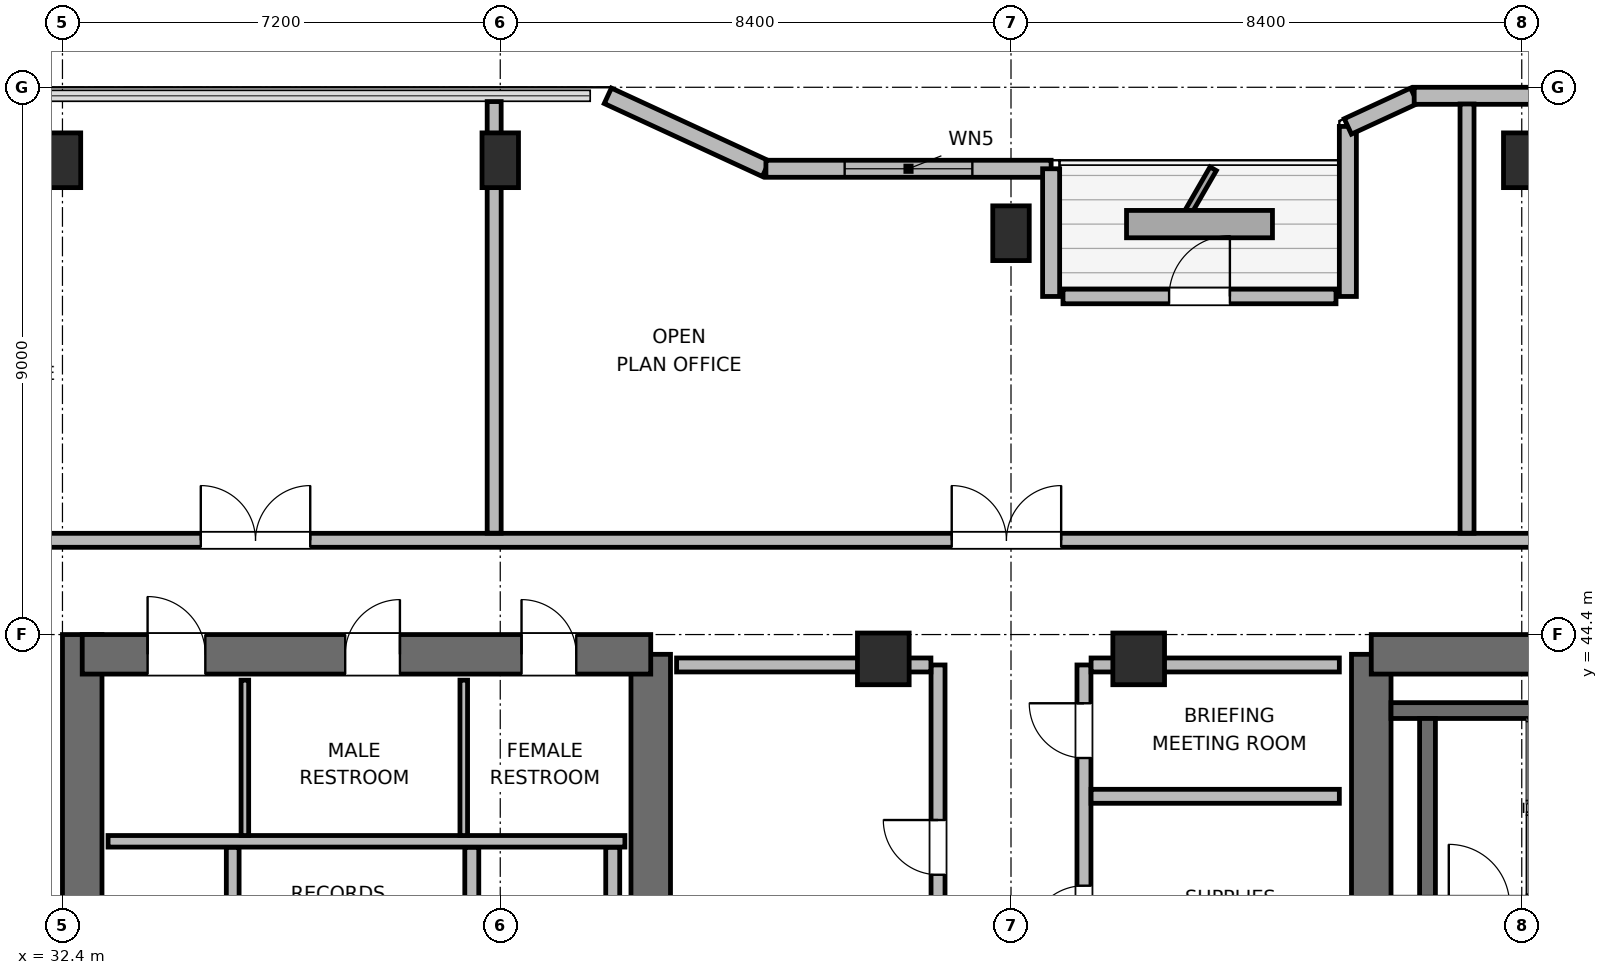
"""IFC4 building model, lengths in metres.
Left out: names, types, materials, properties, quantities, classifications, styles, units other than length and angle.
Written with IfcOpenShell. Run it as: python <this file> out.ifc"""

import sys

from ifc_helpers import new_model, si_unit, direction, frame, frame_2d, origin, origin_2d, place, context, subcontext, project, spatial, rectangle, extrude, element, fill, save


model = new_model("IFC4")
c1 = context("Model", 3, precision=1e-05, world=origin(), true_north=direction((0.0, 1.0)))
c2 = subcontext(c1, "Body", "Model", "MODEL_VIEW")
j1 = project(units=[si_unit("LENGTHUNIT", "METRE"), si_unit("PLANEANGLEUNIT", "RADIAN")], contexts=[c1])
p1 = place(None, origin())
s1 = spatial("IfcSite", under=j1, at=p1, CompositionType="ELEMENT")
p2 = place(p1, origin())
s2 = spatial("IfcBuilding", under=s1, at=p2, CompositionType="ELEMENT")
p3 = place(p2, frame((0.0, 0.0, 255.0)))
s3 = spatial("IfcBuildingStorey", under=s2, at=p3, CompositionType="ELEMENT", Elevation=255.0)
p4 = place(p3, frame((32.725, 27.6, 0.0), z_axis=(0.0, 0.0, 1.0), x_axis=(0.0, 1.0, 0.0)))
e1 = element("IfcWall", 1, at=p4, inside=s3, PredefinedType="SHEAR", context=c2, shape_type="SweptSolid", body=[
    extrude(rectangle(XDim=16.8, YDim=0.65, at=frame_2d((8.4, 0.0))), origin(), (0.0, 0.0, 1.0), 3.9),
])
p5 = place(p3, frame((42.075, 37.8, 0.0), z_axis=(0.0, 0.0, 1.0), x_axis=(0.0, 1.0, 0.0)))
e2 = element("IfcWall", 2, at=p5, inside=s3, PredefinedType="SHEAR", context=c2, shape_type="SweptSolid", body=[
    extrude(rectangle(XDim=6.275, YDim=0.65, at=frame_2d((3.137, 0.0))), origin(), (0.0, 0.0, 1.0), 3.9),
])
p6 = place(p3, frame((32.725, 44.075, 0.0), z_axis=(0.0, 0.0, 1.0), x_axis=(1.0, 0.0, 0.0)))
e3 = element("IfcWall", 3, at=p6, inside=s3, PredefinedType="SHEAR", context=c2, shape_type="SweptSolid", body=[
    extrude(rectangle(XDim=9.35, YDim=0.65, at=frame_2d((4.675, 0.0))), origin(), (0.0, 0.0, 1.0), 3.9),
])
p7 = place(p6, frame((1.075, 0.0, 0.0)))
e4 = element("IfcOpeningElement", 4, at=p7, cuts=e3, PredefinedType="OPENING", context=c2, shape_type="SweptSolid", body=[
    extrude(rectangle(XDim=0.95, YDim=2.04, at=frame_2d((0.475, 1.02))), frame((0.0, 0.335, 0.0), z_axis=(0.0, -1.0, 0.0), x_axis=(1.0, 0.0, 0.0)), (0.0, 0.0, 1.0), 0.67),
])
p8 = place(p6, frame((4.325, 0.0, 0.0)))
e5 = element("IfcOpeningElement", 5, at=p8, cuts=e3, PredefinedType="OPENING", context=c2, shape_type="SweptSolid", body=[
    extrude(rectangle(XDim=0.9, YDim=2.02, at=frame_2d((0.45, 1.01))), frame((0.0, 0.335, 0.0), z_axis=(0.0, -1.0, 0.0), x_axis=(1.0, 0.0, 0.0)), (0.0, 0.0, 1.0), 0.67),
])
p9 = place(p6, frame((7.225, 0.0, 0.0)))
e6 = element("IfcOpeningElement", 6, at=p9, cuts=e3, PredefinedType="OPENING", context=c2, shape_type="SweptSolid", body=[
    extrude(rectangle(XDim=0.9, YDim=2.02, at=frame_2d((0.45, 1.01))), frame((0.0, 0.335, 0.0), z_axis=(0.0, -1.0, 0.0), x_axis=(1.0, 0.0, 0.0)), (0.0, 0.0, 1.0), 0.67),
])
p10 = place(p3, frame((53.925, 38.0, 0.0), z_axis=(0.0, 0.0, 1.0), x_axis=(0.0, 1.0, 0.0)))
e7 = element("IfcWall", 7, at=p10, inside=s3, PredefinedType="SHEAR", context=c2, shape_type="SweptSolid", body=[
    extrude(rectangle(XDim=6.075, YDim=0.65, at=frame_2d((3.038, 0.0))), origin(), (0.0, 0.0, 1.0), 3.9),
])
p11 = place(p3, frame((53.925, 44.075, 0.0), z_axis=(0.0, 0.0, 1.0), x_axis=(1.0, 0.0, 0.0)))
e8 = element("IfcWall", 8, at=p11, inside=s3, PredefinedType="SHEAR", context=c2, shape_type="SweptSolid", body=[
    extrude(rectangle(XDim=9.35, YDim=0.65, at=frame_2d((4.675, 0.0))), origin(), (0.0, 0.0, 1.0), 3.9),
])
p12 = place(p3, frame((54.25, 43.15, 0.0), z_axis=(0.0, 0.0, 1.0), x_axis=(1.0, 0.0, 0.0)))
e9 = element("IfcWall", 9, at=p12, inside=s3, PredefinedType="SHEAR", context=c2, shape_type="SweptSolid", body=[
    extrude(rectangle(XDim=8.7, YDim=0.26, at=frame_2d((4.35, 0.0))), origin(), (0.0, 0.0, 1.0), 3.9),
])
p13 = place(p3, frame((54.85, 40.08, 0.0), z_axis=(0.0, 0.0, 1.0), x_axis=(0.0, 1.0, 0.0)))
e10 = element("IfcWall", 10, at=p13, inside=s3, PredefinedType="SHEAR", context=c2, shape_type="SweptSolid", body=[
    extrude(rectangle(XDim=2.94, YDim=0.26, at=frame_2d((1.47, 0.0))), origin(), (0.0, 0.0, 1.0), 3.9),
])
for number, where, z_axis, x_axis in (
    (11, (32.4, 52.2, 0.0), (0.0, 0.0, 1.0), (1.0, 0.0, 0.0)),
    (12, (39.6, 52.2, 0.0), (0.0, 0.0, 1.0), (1.0, 0.0, 0.0)),
    (13, (48.0, 51.0, 0.0), (0.0, 0.0, 1.0), (1.0, 0.0, 0.0)),
    (14, (56.4, 52.2, 0.0), (0.0, 0.0, 1.0), (1.0, 0.0, 0.0)),
):
    element("IfcColumn", number, at=place(p3, frame(where, z_axis=z_axis, x_axis=x_axis)), inside=s3, PredefinedType="COLUMN", context=c2, shape_type="SweptSolid", body=[
        extrude(rectangle(XDim=0.6, YDim=0.9, at=origin_2d()), origin(), (0.0, 0.0, 1.0), 3.9),
    ])
for number, where, z_axis, x_axis in (
    (15, (45.9, 44.0, 0.0), (0.0, 0.0, 1.0), (1.0, 0.0, 0.0)),
    (16, (50.1, 44.0, 0.0), (0.0, 0.0, 1.0), (1.0, 0.0, 0.0)),
):
    element("IfcColumn", number, at=place(p3, frame(where, z_axis=z_axis, x_axis=x_axis)), inside=s3, PredefinedType="COLUMN", context=c2, shape_type="SweptSolid", body=[
        extrude(rectangle(XDim=0.85, YDim=0.85, at=origin_2d()), origin(), (0.0, 0.0, 1.0), 3.9),
    ])
p14 = place(p3, frame((41.369, 53.26, 0.0), z_axis=(0.0, 0.0, 1.0), x_axis=(0.907956889006, -0.419063584324, 0.0)))
e17 = element("IfcWall", 17, at=p14, inside=s3, PredefinedType="SOLIDWALL", context=c2, shape_type="SweptSolid", body=[
    extrude(rectangle(XDim=2.864, YDim=0.28, at=frame_2d((1.432, 0.0))), origin(), (0.0, 0.0, 1.0), 2.265),
])
p15 = place(p3, frame((43.969, 52.06, 0.0), z_axis=(0.0, 0.0, 1.0), x_axis=(1.0, 0.0, 0.0)))
e18 = element("IfcWall", 18, at=p15, inside=s3, PredefinedType="SOLIDWALL", context=c2, shape_type="SweptSolid", body=[
    extrude(rectangle(XDim=4.691, YDim=0.28, at=frame_2d((2.345, 0.0))), origin(), (0.0, 0.0, 1.0), 2.265),
])
p16 = place(p15, frame((1.295, 0.0, 0.85)))
e19 = element("IfcOpeningElement", 19, at=p16, cuts=e18, PredefinedType="OPENING", context=c2, shape_type="SweptSolid", body=[
    extrude(rectangle(XDim=2.1, YDim=1.05, at=frame_2d((1.05, 0.525))), frame((0.0, 0.15, 0.0), z_axis=(0.0, -1.0, 0.0), x_axis=(1.0, 0.0, 0.0)), (0.0, 0.0, 1.0), 0.3),
])
p17 = place(p3, frame((48.66, 52.06, 0.0), z_axis=(0.0, 0.0, 1.0), x_axis=(0.0, -1.0, 0.0)))
e20 = element("IfcWall", 20, at=p17, inside=s3, PredefinedType="SOLIDWALL", context=c2, shape_type="SweptSolid", body=[
    extrude(rectangle(XDim=2.1, YDim=0.28, at=frame_2d((1.05, 0.0))), origin(), (0.0, 0.0, 1.0), 2.265),
])
p18 = place(p3, frame((48.855, 49.96, 0.0), z_axis=(0.0, 0.0, 1.0), x_axis=(1.0, 0.0, 0.0)))
e21 = element("IfcWall", 21, at=p18, inside=s3, PredefinedType="SOLIDWALL", context=c2, shape_type="SweptSolid", body=[
    extrude(rectangle(XDim=4.49, YDim=0.24, at=frame_2d((2.245, 0.0))), origin(), (0.0, 0.0, 1.0), 2.215),
])
p19 = place(p18, frame((1.745, 0.0, 0.0)))
e22 = element("IfcOpeningElement", 22, at=p19, cuts=e21, PredefinedType="OPENING", context=c2, shape_type="SweptSolid", body=[
    extrude(rectangle(XDim=1.0, YDim=2.02, at=frame_2d((0.5, 1.01))), frame((0.0, 0.13, 0.0), z_axis=(0.0, -1.0, 0.0), x_axis=(1.0, 0.0, 0.0)), (0.0, 0.0, 1.0), 0.26),
])
p20 = place(p3, frame((53.54, 49.96, 0.0), z_axis=(0.0, 0.0, 1.0), x_axis=(0.0, 1.0, 0.0)))
e23 = element("IfcWall", 23, at=p20, inside=s3, PredefinedType="SOLIDWALL", context=c2, shape_type="SweptSolid", body=[
    extrude(rectangle(XDim=2.796, YDim=0.28, at=frame_2d((1.398, 0.0))), origin(), (0.0, 0.0, 1.0), 2.265),
])
p21 = place(p3, frame((53.54, 52.756, 0.0), z_axis=(0.0, 0.0, 1.0), x_axis=(0.907893953211, 0.419199916176, 0.0)))
e24 = element("IfcWall", 24, at=p21, inside=s3, PredefinedType="SOLIDWALL", context=c2, shape_type="SweptSolid", body=[
    extrude(rectangle(XDim=1.201, YDim=0.28, at=frame_2d((0.601, 0.0))), origin(), (0.0, 0.0, 1.0), 3.68),
])
p22 = place(p3, frame((54.631, 53.26, 0.0), z_axis=(0.0, 0.0, 1.0), x_axis=(1.0, 0.0, 0.0)))
e25 = element("IfcWall", 25, at=p22, inside=s3, PredefinedType="SOLIDWALL", context=c2, shape_type="SweptSolid", body=[
    extrude(rectangle(XDim=11.351, YDim=0.28, at=frame_2d((5.675, 0.0))), origin(), (0.0, 0.0, 1.0), 3.68),
])
p23 = place(p3, frame((33.15, 41.0, 0.0), z_axis=(0.0, 0.0, 1.0), x_axis=(1.0, 0.0, 0.0)))
e26 = element("IfcWall", 26, at=p23, inside=s3, PredefinedType="PLUMBINGWALL", context=c2, shape_type="SweptSolid", body=[
    extrude(rectangle(XDim=8.5, YDim=0.19, at=frame_2d((4.25, 0.0))), origin(), (0.0, 0.0, 1.0), 3.68),
])
for number, where, z_axis, x_axis in (
    (27, (35.4, 41.095, 0.0), (0.0, 0.0, 1.0), (0.0, 1.0, 0.0)),
    (28, (39.0, 41.095, 0.0), (0.0, 0.0, 1.0), (0.0, 1.0, 0.0)),
):
    element("IfcWall", number, at=place(p3, frame(where, z_axis=z_axis, x_axis=x_axis)), inside=s3, PredefinedType="PARTITIONING", context=c2, shape_type="SweptSolid", body=[
        extrude(rectangle(XDim=2.555, YDim=0.125, at=frame_2d((1.277, 0.0))), origin(), (0.0, 0.0, 1.0), 3.68),
    ])
p24 = place(p3, frame((35.2, 39.58, 0.0), z_axis=(0.0, 0.0, 1.0), x_axis=(0.0, 1.0, 0.0)))
e29 = element("IfcWall", 29, at=p24, inside=s3, PredefinedType="PARTITIONING", context=c2, shape_type="SweptSolid", body=[
    extrude(rectangle(XDim=1.32, YDim=0.21, at=frame_2d((0.66, 0.0))), origin(), (0.0, 0.0, 1.0), 3.68),
])
for number, where, z_axis, x_axis in (
    (30, (41.45, 38.117, 0.0), (0.0, 0.0, 1.0), (0.0, 1.0, 0.0)),
    (31, (39.132, 38.117, 0.0), (0.0, 0.0, 1.0), (0.0, 1.0, 0.0)),
):
    element("IfcWall", number, at=place(p3, frame(where, z_axis=z_axis, x_axis=x_axis)), inside=s3, PredefinedType="PARTITIONING", context=c2, shape_type="SweptSolid", body=[
        extrude(rectangle(XDim=2.783, YDim=0.23, at=frame_2d((1.392, 0.0))), origin(), (0.0, 0.0, 1.0), 3.68),
    ])
p25 = place(p3, frame((46.8, 37.9, 0.0), z_axis=(0.0, 0.0, 1.0), x_axis=(0.0, 1.0, 0.0)))
e32 = element("IfcWall", 32, at=p25, inside=s3, PredefinedType="PARTITIONING", context=c2, shape_type="SweptSolid", body=[
    extrude(rectangle(XDim=6.0, YDim=0.23, at=frame_2d((3.0, 0.0))), origin(), (0.0, 0.0, 1.0), 3.68),
])
p26 = place(p25, frame((2.55, 0.0, 0.0)))
e33 = element("IfcOpeningElement", 33, at=p26, cuts=e32, PredefinedType="OPENING", context=c2, shape_type="SweptSolid", body=[
    extrude(rectangle(XDim=0.9, YDim=2.02, at=frame_2d((0.45, 1.01))), frame((0.0, 0.125, 0.0), z_axis=(0.0, -1.0, 0.0), x_axis=(1.0, 0.0, 0.0)), (0.0, 0.0, 1.0), 0.25),
])
p27 = place(p3, frame((42.5, 43.9, 0.0), z_axis=(0.0, 0.0, 1.0), x_axis=(1.0, 0.0, 0.0)))
e34 = element("IfcWall", 34, at=p27, inside=s3, PredefinedType="PARTITIONING", context=c2, shape_type="SweptSolid", body=[
    extrude(rectangle(XDim=4.183, YDim=0.23, at=frame_2d((2.092, 0.0))), origin(), (0.0, 0.0, 1.0), 2.765),
])
p28 = place(p3, frame((49.2, 37.9, 0.0), z_axis=(0.0, 0.0, 1.0), x_axis=(0.0, 1.0, 0.0)))
e35 = element("IfcWall", 35, at=p28, inside=s3, PredefinedType="PARTITIONING", context=c2, shape_type="SweptSolid", body=[
    extrude(rectangle(XDim=6.0, YDim=0.23, at=frame_2d((3.0, 0.0))), origin(), (0.0, 0.0, 1.0), 3.68),
])
p29 = place(p28, frame((1.47, 0.0, 0.0)))
e36 = element("IfcOpeningElement", 36, at=p29, cuts=e35, PredefinedType="OPENING", context=c2, shape_type="SweptSolid", body=[
    extrude(rectangle(XDim=0.9, YDim=2.02, at=frame_2d((0.45, 1.01))), frame((0.0, 0.125, 0.0), z_axis=(0.0, -1.0, 0.0), x_axis=(1.0, 0.0, 0.0)), (0.0, 0.0, 1.0), 0.25),
])
p30 = place(p28, frame((4.47, 0.0, 0.0)))
e37 = element("IfcOpeningElement", 37, at=p30, cuts=e35, PredefinedType="OPENING", context=c2, shape_type="SweptSolid", body=[
    extrude(rectangle(XDim=0.9, YDim=2.02, at=frame_2d((0.45, 1.01))), frame((0.0, 0.125, 0.0), z_axis=(0.0, -1.0, 0.0), x_axis=(1.0, 0.0, 0.0)), (0.0, 0.0, 1.0), 0.25),
])
p31 = place(p3, frame((49.317, 43.9, 0.0), z_axis=(0.0, 0.0, 1.0), x_axis=(1.0, 0.0, 0.0)))
e38 = element("IfcWall", 38, at=p31, inside=s3, PredefinedType="PARTITIONING", context=c2, shape_type="SweptSolid", body=[
    extrude(rectangle(XDim=4.083, YDim=0.23, at=frame_2d((2.042, 0.0))), origin(), (0.0, 0.0, 1.0), 2.765),
])
p32 = place(p3, frame((49.317, 41.74, 0.0), z_axis=(0.0, 0.0, 1.0), x_axis=(1.0, 0.0, 0.0)))
e39 = element("IfcWall", 39, at=p32, inside=s3, PredefinedType="PARTITIONING", context=c2, shape_type="SweptSolid", body=[
    extrude(rectangle(XDim=4.083, YDim=0.23, at=frame_2d((2.042, 0.0))), origin(), (0.0, 0.0, 1.0), 3.68),
])
p33 = place(p3, frame((30.8, 45.95, 0.0), z_axis=(0.0, 0.0, 1.0), x_axis=(1.0, 0.0, 0.0)))
e40 = element("IfcWall", 40, at=p33, inside=s3, PredefinedType="PARTITIONING", context=c2, shape_type="SweptSolid", body=[
    extrude(rectangle(XDim=36.0, YDim=0.23, at=frame_2d((18.0, 0.0))), origin(), (0.0, 0.0, 1.0), 3.68),
])
p34 = place(p33, frame((3.875, 0.0, 0.0)))
e41 = element("IfcOpeningElement", 41, at=p34, cuts=e40, PredefinedType="OPENING", context=c2, shape_type="SweptSolid", body=[
    extrude(rectangle(XDim=1.8, YDim=2.06, at=frame_2d((0.9, 1.03))), frame((0.0, 0.125, 0.0), z_axis=(0.0, -1.0, 0.0), x_axis=(1.0, 0.0, 0.0)), (0.0, 0.0, 1.0), 0.25),
])
p35 = place(p33, frame((16.225, 0.0, 0.0)))
e42 = element("IfcOpeningElement", 42, at=p35, cuts=e40, PredefinedType="OPENING", context=c2, shape_type="SweptSolid", body=[
    extrude(rectangle(XDim=1.8, YDim=2.06, at=frame_2d((0.9, 1.03))), frame((0.0, 0.125, 0.0), z_axis=(0.0, -1.0, 0.0), x_axis=(1.0, 0.0, 0.0)), (0.0, 0.0, 1.0), 0.25),
])
p36 = place(p33, frame((29.875, 0.0, 0.0)))
e43 = element("IfcOpeningElement", 43, at=p36, cuts=e40, PredefinedType="OPENING", context=c2, shape_type="SweptSolid", body=[
    extrude(rectangle(XDim=1.8, YDim=2.06, at=frame_2d((0.9, 1.03))), frame((0.0, 0.125, 0.0), z_axis=(0.0, -1.0, 0.0), x_axis=(1.0, 0.0, 0.0)), (0.0, 0.0, 1.0), 0.25),
])
p37 = place(p3, frame((39.5, 46.067, 0.0), z_axis=(0.0, 0.0, 1.0), x_axis=(0.0, 1.0, 0.0)))
e44 = element("IfcWall", 44, at=p37, inside=s3, PredefinedType="PARTITIONING", context=c2, shape_type="SweptSolid", body=[
    extrude(rectangle(XDim=7.098, YDim=0.23, at=frame_2d((3.549, 0.0))), origin(), (0.0, 0.0, 1.0), 3.043),
])
p38 = place(p3, frame((55.5, 46.067, 0.0), z_axis=(0.0, 0.0, 1.0), x_axis=(0.0, 1.0, 0.0)))
e45 = element("IfcWall", 45, at=p38, inside=s3, PredefinedType="PARTITIONING", context=c2, shape_type="SweptSolid", body=[
    extrude(rectangle(XDim=7.058, YDim=0.23, at=frame_2d((3.529, 0.0))), origin(), (0.0, 0.0, 1.0), 3.043),
])
p39 = place(p16, origin())
e46 = element("IfcWindow", 46, at=p39, inside=s3, PartitioningType="SINGLE_PANEL", PredefinedType="WINDOW", context=c2, shape_type="SweptSolid", body=[
    extrude(rectangle(XDim=2.1, YDim=1.05, at=frame_2d((1.05, 0.525))), frame((0.0, 0.03, 0.0), z_axis=(0.0, -1.0, 0.0), x_axis=(1.0, 0.0, 0.0)), (0.0, 0.0, 1.0), 0.06),
])
fill(e19, e46)
p40 = place(p19, origin())
e47 = element("IfcDoor", 47, at=p40, inside=s3, OperationType="SINGLE_SWING_RIGHT", PredefinedType="DOOR", context=c2, shape_type="SweptSolid", body=[
    extrude(rectangle(XDim=1.0, YDim=2.02, at=frame_2d((0.5, 1.01))), frame((0.0, 0.025, 0.0), z_axis=(0.0, -1.0, 0.0), x_axis=(1.0, 0.0, 0.0)), (0.0, 0.0, 1.0), 0.05),
])
fill(e22, e47)
p41 = place(p7, origin())
e48 = element("IfcDoor", 48, at=p41, inside=s3, OperationType="SINGLE_SWING_LEFT", PredefinedType="DOOR", context=c2, shape_type="SweptSolid", body=[
    extrude(rectangle(XDim=0.95, YDim=2.04, at=frame_2d((0.475, 1.02))), frame((0.0, 0.025, 0.0), z_axis=(0.0, -1.0, 0.0), x_axis=(1.0, 0.0, 0.0)), (0.0, 0.0, 1.0), 0.05),
])
fill(e4, e48)
p42 = place(p8, origin())
e49 = element("IfcDoor", 49, at=p42, inside=s3, OperationType="SINGLE_SWING_RIGHT", PredefinedType="DOOR", context=c2, shape_type="SweptSolid", body=[
    extrude(rectangle(XDim=0.9, YDim=2.02, at=frame_2d((0.45, 1.01))), frame((0.0, 0.025, 0.0), z_axis=(0.0, -1.0, 0.0), x_axis=(1.0, 0.0, 0.0)), (0.0, 0.0, 1.0), 0.05),
])
fill(e5, e49)
p43 = place(p9, origin())
e50 = element("IfcDoor", 50, at=p43, inside=s3, OperationType="SINGLE_SWING_LEFT", PredefinedType="DOOR", context=c2, shape_type="SweptSolid", body=[
    extrude(rectangle(XDim=0.9, YDim=2.02, at=frame_2d((0.45, 1.01))), frame((0.0, 0.025, 0.0), z_axis=(0.0, -1.0, 0.0), x_axis=(1.0, 0.0, 0.0)), (0.0, 0.0, 1.0), 0.05),
])
fill(e6, e50)
p44 = place(p26, origin())
e51 = element("IfcDoor", 51, at=p44, inside=s3, OperationType="SINGLE_SWING_RIGHT", PredefinedType="DOOR", context=c2, shape_type="SweptSolid", body=[
    extrude(rectangle(XDim=0.9, YDim=2.02, at=frame_2d((0.45, 1.01))), frame((0.0, 0.025, 0.0), z_axis=(0.0, -1.0, 0.0), x_axis=(1.0, 0.0, 0.0)), (0.0, 0.0, 1.0), 0.05),
])
fill(e33, e51)
p45 = place(p29, origin())
e52 = element("IfcDoor", 52, at=p45, inside=s3, OperationType="SINGLE_SWING_LEFT", PredefinedType="DOOR", context=c2, shape_type="SweptSolid", body=[
    extrude(rectangle(XDim=0.9, YDim=2.02, at=frame_2d((0.45, 1.01))), frame((0.0, 0.025, 0.0), z_axis=(0.0, -1.0, 0.0), x_axis=(1.0, 0.0, 0.0)), (0.0, 0.0, 1.0), 0.05),
])
fill(e36, e52)
p46 = place(p30, origin())
e53 = element("IfcDoor", 53, at=p46, inside=s3, OperationType="SINGLE_SWING_RIGHT", PredefinedType="DOOR", context=c2, shape_type="SweptSolid", body=[
    extrude(rectangle(XDim=0.9, YDim=2.02, at=frame_2d((0.45, 1.01))), frame((0.0, 0.025, 0.0), z_axis=(0.0, -1.0, 0.0), x_axis=(1.0, 0.0, 0.0)), (0.0, 0.0, 1.0), 0.05),
])
fill(e37, e53)
p47 = place(p34, origin())
e54 = element("IfcDoor", 54, at=p47, inside=s3, OperationType="DOUBLE_DOOR_SINGLE_SWING", PredefinedType="DOOR", context=c2, shape_type="SweptSolid", body=[
    extrude(rectangle(XDim=1.8, YDim=2.06, at=frame_2d((0.9, 1.03))), frame((0.0, 0.025, 0.0), z_axis=(0.0, -1.0, 0.0), x_axis=(1.0, 0.0, 0.0)), (0.0, 0.0, 1.0), 0.05),
])
fill(e41, e54)
p48 = place(p35, origin())
e55 = element("IfcDoor", 55, at=p48, inside=s3, OperationType="DOUBLE_DOOR_SINGLE_SWING", PredefinedType="DOOR", context=c2, shape_type="SweptSolid", body=[
    extrude(rectangle(XDim=1.8, YDim=2.06, at=frame_2d((0.9, 1.03))), frame((0.0, 0.025, 0.0), z_axis=(0.0, -1.0, 0.0), x_axis=(1.0, 0.0, 0.0)), (0.0, 0.0, 1.0), 0.05),
])
fill(e42, e55)
save(model, sys.argv[1])
